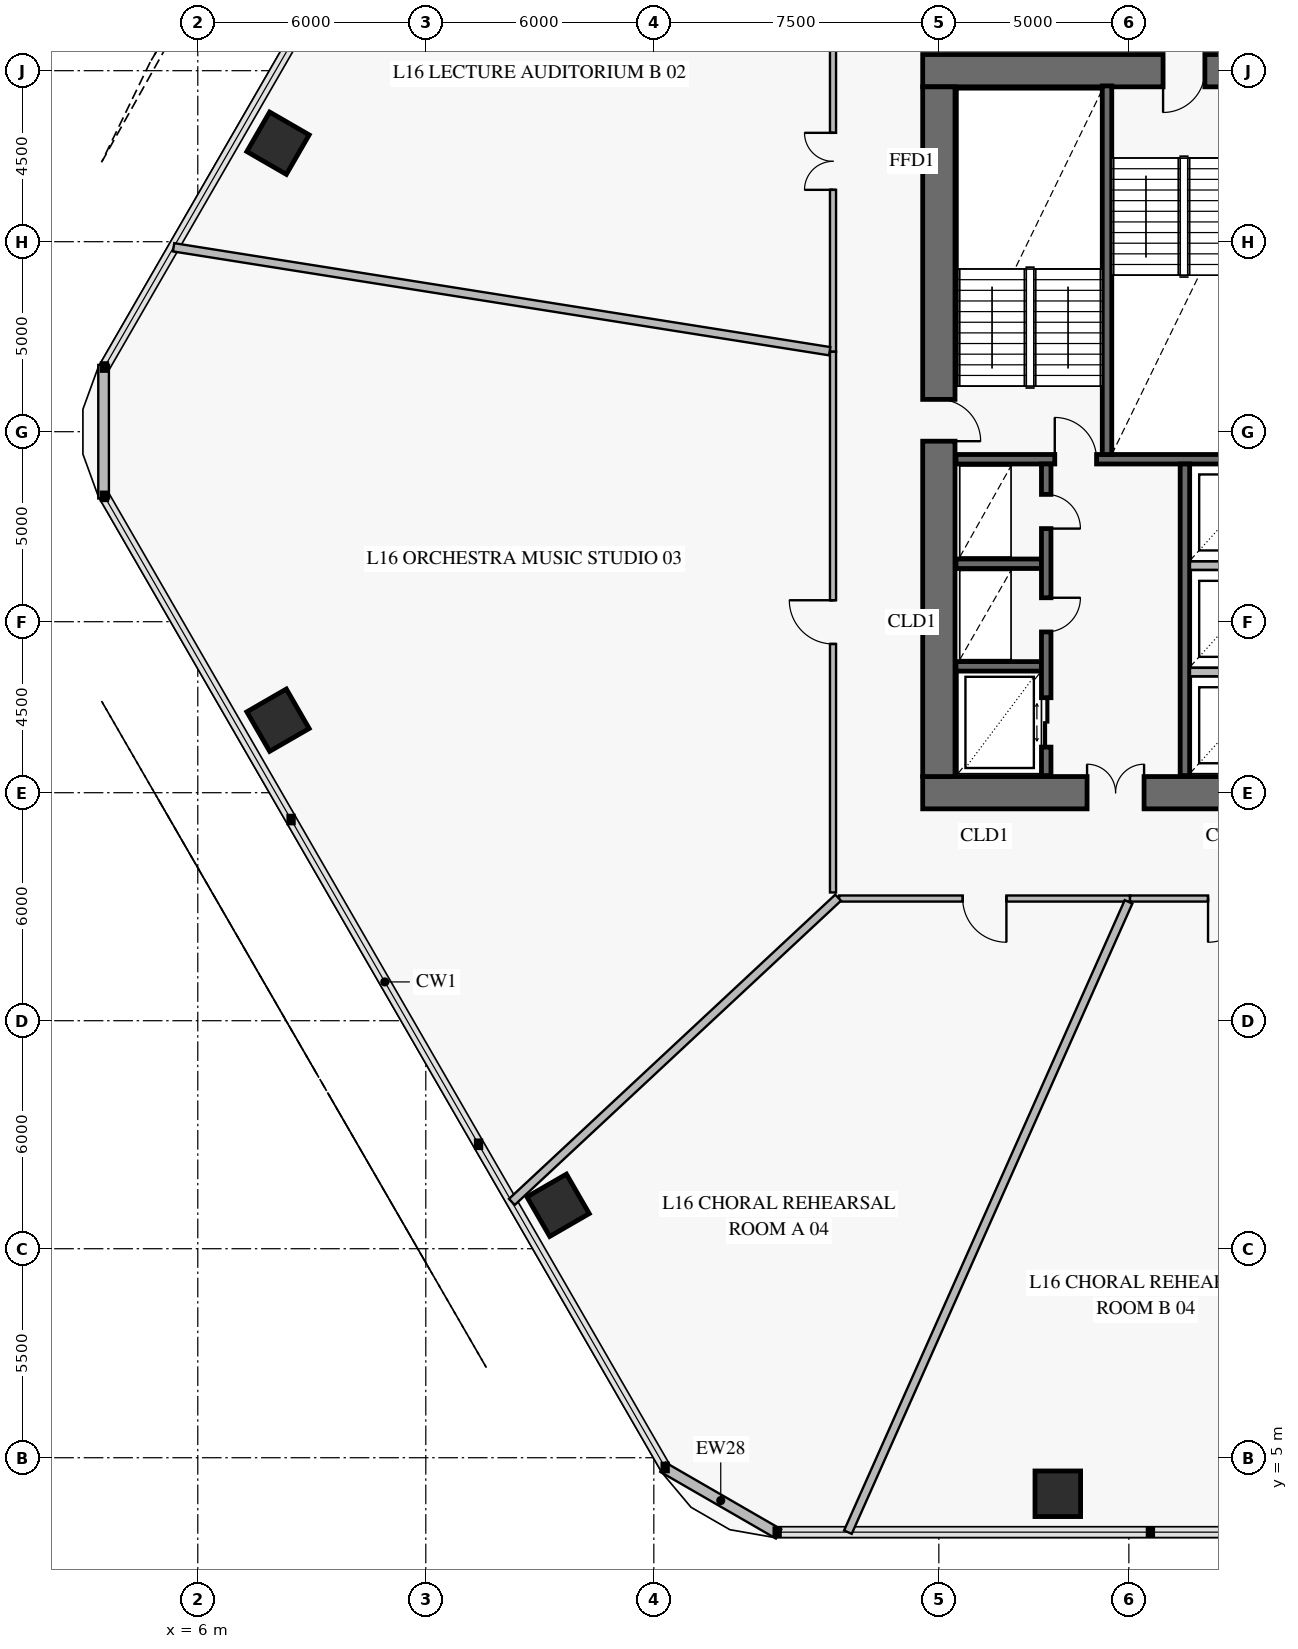
"""IFC4 building model, lengths in metres.
Left out: names, types, materials, properties, quantities, classifications, styles, units other than length and angle.
Written with IfcOpenShell. Run it as: python <this file> out.ifc"""

import sys

from ifc_helpers import new_model, si_unit, direction, frame, frame_2d, origin, origin_2d, place, context, subcontext, project, spatial, rectangle, extrude, element, fill, save


model = new_model("IFC4")
c1 = context("Model", 3, precision=1e-05, world=origin(), true_north=direction((0.0, 1.0)))
c2 = subcontext(c1, "Body", "Model", "MODEL_VIEW")
j1 = project(units=[si_unit("LENGTHUNIT", "METRE"), si_unit("PLANEANGLEUNIT", "RADIAN")], contexts=[c1])
p1 = place(None, origin())
s1 = spatial("IfcSite", under=j1, at=p1, CompositionType="ELEMENT")
p2 = place(p1, origin())
s2 = spatial("IfcBuilding", under=s1, at=p2, CompositionType="ELEMENT")
p3 = place(p2, frame((0.0, 0.0, 66.6)))
s3 = spatial("IfcBuildingStorey", under=s2, at=p3, CompositionType="ELEMENT", Elevation=66.6)
p4 = place(p3, frame((25.075, 22.5, 0.0), z_axis=(0.0, 0.0, 1.0), x_axis=(1.0, 0.0, 0.0)))
e1 = element("IfcWall", 1, at=p4, inside=s3, PredefinedType="SHEAR", context=c2, shape_type="SweptSolid", body=[
    extrude(rectangle(XDim=9.975, YDim=0.85, at=frame_2d((4.988, 0.0))), origin(), (0.0, 0.0, 1.0), 4.2),
])
p5 = place(p4, frame((4.325, 0.0, 0.0)))
e2 = element("IfcOpeningElement", 2, at=p5, cuts=e1, PredefinedType="OPENING", context=c2, shape_type="SweptSolid", body=[
    extrude(rectangle(XDim=1.5, YDim=2.15, at=frame_2d((0.75, 1.075))), frame((0.0, 0.437, 0.0), z_axis=(0.0, -1.0, 0.0), x_axis=(1.0, 0.0, 0.0)), (0.0, 0.0, 1.0), 0.874),
])
p6 = place(p3, frame((36.75, 41.5, 0.0), z_axis=(0.0, 0.0, 1.0), x_axis=(-1.0, 0.0, 0.0)))
e3 = element("IfcWall", 3, at=p6, inside=s3, PredefinedType="SHEAR", context=c2, shape_type="SweptSolid", body=[
    extrude(rectangle(XDim=11.675, YDim=0.85, at=frame_2d((5.837, 0.0))), origin(), (0.0, 0.0, 1.0), 4.2),
])
p7 = place(p6, frame((4.25, 0.0, 0.0)))
e4 = element("IfcOpeningElement", 4, at=p7, cuts=e3, PredefinedType="OPENING", context=c2, shape_type="SweptSolid", body=[
    extrude(rectangle(XDim=1.1, YDim=2.15, at=frame_2d((0.55, 1.075))), frame((0.0, 0.437, 0.0), z_axis=(0.0, -1.0, 0.0), x_axis=(1.0, 0.0, 0.0)), (0.0, 0.0, 1.0), 0.874),
])
p8 = place(p3, frame((25.5, 22.925, 0.0), z_axis=(0.0, 0.0, 1.0), x_axis=(0.0, 1.0, 0.0)))
e5 = element("IfcWall", 5, at=p8, inside=s3, PredefinedType="SHEAR", context=c2, shape_type="SweptSolid", body=[
    extrude(rectangle(XDim=18.15, YDim=0.85, at=frame_2d((9.075, 0.0))), origin(), (0.0, 0.0, 1.0), 4.2),
])
p9 = place(p8, frame((8.825, 0.0, 0.0)))
e6 = element("IfcOpeningElement", 6, at=p9, cuts=e5, PredefinedType="OPENING", context=c2, shape_type="SweptSolid", body=[
    extrude(rectangle(XDim=1.1, YDim=2.15, at=frame_2d((0.55, 1.075))), frame((0.0, 0.437, 0.0), z_axis=(0.0, -1.0, 0.0), x_axis=(1.0, 0.0, 0.0)), (0.0, 0.0, 1.0), 0.874),
])
for number, where, z_axis, x_axis in (
    (7, (8.111, 39.592, 0.0), (0.0, 0.0, 1.0), (-0.5, -0.866, 0.0)),
    (8, (8.111, 24.408, 0.0), (0.0, 0.0, 1.0), (0.5, -0.866, 0.0)),
    (9, (15.481, 11.643, 0.0), (0.0, 0.0, 1.0), (0.5, -0.866, 0.0)),
    (10, (28.63, 4.052, 0.0), (0.0, 0.0, 1.0), (1.0, 0.0, 0.0)),
):
    element("IfcColumn", number, at=place(p3, frame(where, z_axis=z_axis, x_axis=x_axis)), inside=s3, PredefinedType="COLUMN", context=c2, shape_type="SweptSolid", body=[
        extrude(rectangle(XDim=1.2, YDim=1.2, at=origin_2d()), origin(), (0.0, 0.0, 1.0), 3.92),
    ])
p10 = place(p3, frame((21.283, 2.994, 0.0), z_axis=(0.0, 0.0, 1.0), x_axis=(-0.866007452331, 0.500031091541, 0.0)))
e11 = element("IfcWall", 11, at=p10, inside=s3, PredefinedType="SOLIDWALL", context=c2, shape_type="SweptSolid", body=[
    extrude(rectangle(XDim=3.515, YDim=0.28, at=frame_2d((1.757, 0.0))), origin(), (0.0, 0.0, 1.0), 3.92),
])
p11 = place(p3, frame((3.521, 30.242, 0.0), z_axis=(0.0, 0.0, 1.0), x_axis=(0.0, 1.0, 0.0)))
e12 = element("IfcWall", 12, at=p11, inside=s3, PredefinedType="SOLIDWALL", context=c2, shape_type="SweptSolid", body=[
    extrude(rectangle(XDim=3.515, YDim=0.28, at=frame_2d((1.758, 0.0))), origin(), (0.0, 0.0, 1.0), 3.92),
])
p12 = place(p3, frame((25.95, 31.275, 0.0), z_axis=(0.0, 0.0, 1.0), x_axis=(1.0, 0.0, 0.0)))
e13 = element("IfcWall", 13, at=p12, inside=s3, PredefinedType="SOLIDWALL", context=c2, shape_type="SweptSolid", body=[
    extrude(rectangle(XDim=20.1, YDim=0.25, at=frame_2d((10.05, 0.0))), origin(), (0.0, 0.0, 1.0), 4.2),
])
p13 = place(p12, frame((2.6, 0.0, 0.0)))
e14 = element("IfcOpeningElement", 14, at=p13, cuts=e13, PredefinedType="OPENING", context=c2, shape_type="SweptSolid", body=[
    extrude(rectangle(XDim=1.1, YDim=2.15, at=frame_2d((0.55, 1.075))), frame((0.0, 0.137, 0.0), z_axis=(0.0, -1.0, 0.0), x_axis=(1.0, 0.0, 0.0)), (0.0, 0.0, 1.0), 0.274),
])
p14 = place(p12, frame((10.6, 0.0, 0.0)))
e15 = element("IfcOpeningElement", 15, at=p14, cuts=e13, PredefinedType="OPENING", context=c2, shape_type="SweptSolid", body=[
    extrude(rectangle(XDim=1.1, YDim=2.15, at=frame_2d((0.55, 1.075))), frame((0.0, 0.137, 0.0), z_axis=(0.0, -1.0, 0.0), x_axis=(1.0, 0.0, 0.0)), (0.0, 0.0, 1.0), 0.274),
])
p15 = place(p12, frame((16.35, 0.0, 0.0)))
e16 = element("IfcOpeningElement", 16, at=p15, cuts=e13, PredefinedType="OPENING", context=c2, shape_type="SweptSolid", body=[
    extrude(rectangle(XDim=1.1, YDim=2.15, at=frame_2d((0.55, 1.075))), frame((0.0, 0.137, 0.0), z_axis=(0.0, -1.0, 0.0), x_axis=(1.0, 0.0, 0.0)), (0.0, 0.0, 1.0), 0.274),
])
p16 = place(p3, frame((29.925, 31.4, 0.0), z_axis=(0.0, 0.0, 1.0), x_axis=(0.0, 1.0, 0.0)))
e17 = element("IfcWall", 17, at=p16, inside=s3, PredefinedType="SOLIDWALL", context=c2, shape_type="SweptSolid", body=[
    extrude(rectangle(XDim=9.7, YDim=0.25, at=frame_2d((4.85, 0.0))), origin(), (0.0, 0.0, 1.0), 4.2),
])
for number, where, z_axis, x_axis in (
    (18, (25.95, 25.825, 0.0), (0.0, 0.0, 1.0), (1.0, 0.0, 0.0)),
    (19, (25.95, 28.525, 0.0), (0.0, 0.0, 1.0), (1.0, 0.0, 0.0)),
):
    element("IfcWall", number, at=place(p3, frame(where, z_axis=z_axis, x_axis=x_axis)), inside=s3, PredefinedType="SOLIDWALL", context=c2, shape_type="SweptSolid", body=[
        extrude(rectangle(XDim=2.25, YDim=0.25, at=frame_2d((1.125, 0.0))), origin(), (0.0, 0.0, 1.0), 4.2),
    ])
p17 = place(p3, frame((28.325, 22.95, 0.0), z_axis=(0.0, 0.0, 1.0), x_axis=(0.0, 1.0, 0.0)))
e20 = element("IfcWall", 20, at=p17, inside=s3, PredefinedType="SOLIDWALL", context=c2, shape_type="SweptSolid", body=[
    extrude(rectangle(XDim=8.2, YDim=0.25, at=frame_2d((4.1, 0.0))), origin(), (0.0, 0.0, 1.0), 4.2),
])
p18 = place(p17, frame((0.75, 0.0, 0.0)))
e21 = element("IfcOpeningElement", 21, at=p18, cuts=e20, PredefinedType="OPENING", context=c2, shape_type="SweptSolid", body=[
    extrude(rectangle(XDim=1.3, YDim=2.3, at=frame_2d((0.65, 1.15))), frame((0.0, 0.137, 0.0), z_axis=(0.0, -1.0, 0.0), x_axis=(1.0, 0.0, 0.0)), (0.0, 0.0, 1.0), 0.274),
])
p19 = place(p17, frame((3.78, 0.0, 0.0)))
e22 = element("IfcOpeningElement", 22, at=p19, cuts=e20, PredefinedType="OPENING", context=c2, shape_type="SweptSolid", body=[
    extrude(rectangle(XDim=0.9, YDim=2.1, at=frame_2d((0.45, 1.05))), frame((0.0, 0.137, 0.0), z_axis=(0.0, -1.0, 0.0), x_axis=(1.0, 0.0, 0.0)), (0.0, 0.0, 1.0), 0.274),
])
p20 = place(p17, frame((6.5, 0.0, 0.0)))
e23 = element("IfcOpeningElement", 23, at=p20, cuts=e20, PredefinedType="OPENING", context=c2, shape_type="SweptSolid", body=[
    extrude(rectangle(XDim=0.9, YDim=2.1, at=frame_2d((0.45, 1.05))), frame((0.0, 0.137, 0.0), z_axis=(0.0, -1.0, 0.0), x_axis=(1.0, 0.0, 0.0)), (0.0, 0.0, 1.0), 0.274),
])
p21 = place(p3, frame((31.975, 22.95, 0.0), z_axis=(0.0, 0.0, 1.0), x_axis=(0.0, 1.0, 0.0)))
e24 = element("IfcWall", 24, at=p21, inside=s3, PredefinedType="SOLIDWALL", context=c2, shape_type="SweptSolid", body=[
    extrude(rectangle(XDim=8.2, YDim=0.25, at=frame_2d((4.1, 0.0))), origin(), (0.0, 0.0, 1.0), 4.2),
])
p22 = place(p3, frame((22.715, 44.125, 0.0), z_axis=(0.0, 0.0, 1.0), x_axis=(0.0, -1.0, 0.0)))
e25 = element("IfcWall", 25, at=p22, inside=s3, PredefinedType="PARTITIONING", context=c2, shape_type="SweptSolid", body=[
    extrude(rectangle(XDim=10.021, YDim=0.16, at=frame_2d((5.01, 0.0))), origin(), (0.0, 0.0, 1.0), 3.22),
])
p23 = place(p22, frame((4.26, 0.0, 0.0)))
e26 = element("IfcOpeningElement", 26, at=p23, cuts=e25, PredefinedType="OPENING", context=c2, shape_type="SweptSolid", body=[
    extrude(rectangle(XDim=1.5, YDim=2.15, at=frame_2d((0.75, 1.075))), frame((0.0, 0.092, 0.0), z_axis=(0.0, -1.0, 0.0), x_axis=(1.0, 0.0, 0.0)), (0.0, 0.0, 1.0), 0.184),
])
p24 = place(p3, frame((22.715, 34.104, 0.0), z_axis=(0.0, 0.0, 1.0), x_axis=(0.0, -1.0, 0.0)))
e27 = element("IfcWall", 27, at=p24, inside=s3, PredefinedType="PARTITIONING", context=c2, shape_type="SweptSolid", body=[
    extrude(rectangle(XDim=14.229, YDim=0.16, at=frame_2d((7.115, 0.0))), origin(), (0.0, 0.0, 1.0), 3.22),
])
p25 = place(p24, frame((6.54, 0.0, 0.0)))
e28 = element("IfcOpeningElement", 28, at=p25, cuts=e27, PredefinedType="OPENING", context=c2, shape_type="SweptSolid", body=[
    extrude(rectangle(XDim=1.15, YDim=2.2, at=frame_2d((0.575, 1.1))), frame((0.0, 0.092, 0.0), z_axis=(0.0, -1.0, 0.0), x_axis=(1.0, 0.0, 0.0)), (0.0, 0.0, 1.0), 0.184),
])
p26 = place(p3, frame((22.875, 19.715, 0.0), z_axis=(0.0, 0.0, 1.0), x_axis=(1.0, 0.0, 0.0)))
e29 = element("IfcWall", 29, at=p26, inside=s3, PredefinedType="PARTITIONING", context=c2, shape_type="SweptSolid", body=[
    extrude(rectangle(XDim=7.656, YDim=0.16, at=frame_2d((3.828, 0.0))), origin(), (0.0, 0.0, 1.0), 3.22),
])
p27 = place(p26, frame((3.253, 0.0, 0.0)))
e30 = element("IfcOpeningElement", 30, at=p27, cuts=e29, PredefinedType="OPENING", context=c2, shape_type="SweptSolid", body=[
    extrude(rectangle(XDim=1.15, YDim=2.2, at=frame_2d((0.575, 1.1))), frame((0.0, 0.092, 0.0), z_axis=(0.0, -1.0, 0.0), x_axis=(1.0, 0.0, 0.0)), (0.0, 0.0, 1.0), 0.184),
])
p28 = place(p3, frame((30.531, 19.715, 0.0), z_axis=(0.0, 0.0, 1.0), x_axis=(1.0, 0.0, 0.0)))
e31 = element("IfcWall", 31, at=p28, inside=s3, PredefinedType="PARTITIONING", context=c2, shape_type="SweptSolid", body=[
    extrude(rectangle(XDim=5.255, YDim=0.16, at=frame_2d((2.627, 0.0))), origin(), (0.0, 0.0, 1.0), 3.22),
])
p29 = place(p28, frame((2.052, 0.0, 0.0)))
e32 = element("IfcOpeningElement", 32, at=p29, cuts=e31, PredefinedType="OPENING", context=c2, shape_type="SweptSolid", body=[
    extrude(rectangle(XDim=1.15, YDim=2.2, at=frame_2d((0.575, 1.1))), frame((0.0, 0.092, 0.0), z_axis=(0.0, -1.0, 0.0), x_axis=(1.0, 0.0, 0.0)), (0.0, 0.0, 1.0), 0.184),
])
for number, where, z_axis, x_axis in (
    (33, (32.108, 25.675, 0.0), (0.0, 0.0, 1.0), (1.0, 0.0, 0.0)),
    (34, (32.108, 28.475, 0.0), (0.0, 0.0, 1.0), (1.0, 0.0, 0.0)),
):
    element("IfcWall", number, at=place(p3, frame(where, z_axis=z_axis, x_axis=x_axis)), inside=s3, PredefinedType="PARTITIONING", context=c2, shape_type="SweptSolid", body=[
        extrude(rectangle(XDim=2.284, YDim=0.22, at=frame_2d((1.142, 0.0))), origin(), (0.0, 0.0, 1.0), 3.92),
    ])
p30 = place(p3, frame((22.627, 34.118, 0.0), z_axis=(0.0, 0.0, 1.0), x_axis=(-0.987689809262, 0.156425191961, 0.0)))
e35 = element("IfcWall", 35, at=p30, inside=s3, PredefinedType="PARTITIONING", context=c2, shape_type="SweptSolid", body=[
    extrude(rectangle(XDim=17.479, YDim=0.22, at=frame_2d((8.739, 0.0))), origin(), (0.0, 0.0, 1.0), 3.17),
])
p31 = place(p3, frame((22.85, 19.737, 0.0), z_axis=(0.0, 0.0, 1.0), x_axis=(-0.731360864489, -0.681990678744, 0.0)))
e36 = element("IfcWall", 36, at=p31, inside=s3, PredefinedType="PARTITIONING", context=c2, shape_type="SweptSolid", body=[
    extrude(rectangle(XDim=11.74, YDim=0.22, at=frame_2d((5.87, 0.0))), origin(), (0.0, 0.0, 1.0), 3.17),
])
p32 = place(p3, frame((30.491, 19.627, 0.0), z_axis=(0.0, 0.0, 1.0), x_axis=(-0.406746008396, -0.913541287876, 0.0)))
e37 = element("IfcWall", 37, at=p32, inside=s3, PredefinedType="PARTITIONING", context=c2, shape_type="SweptSolid", body=[
    extrude(rectangle(XDim=18.155, YDim=0.22, at=frame_2d((9.078, 0.0))), origin(), (0.0, 0.0, 1.0), 3.17),
])
p33 = place(p9, frame((1.1, 0.0, 0.0), z_axis=(0.0, 0.0, 1.0), x_axis=(-1.0, 0.0, 0.0)))
e38 = element("IfcDoor", 38, at=p33, inside=s3, OperationType="SINGLE_SWING_RIGHT", PredefinedType="USERDEFINED", context=c2, shape_type="SweptSolid", body=[
    extrude(rectangle(XDim=1.1, YDim=2.15, at=frame_2d((0.55, 1.075))), frame((0.0, 0.025, 0.0), z_axis=(0.0, -1.0, 0.0), x_axis=(1.0, 0.0, 0.0)), (0.0, 0.0, 1.0), 0.05),
])
fill(e6, e38)
p34 = place(p7, origin())
e39 = element("IfcDoor", 39, at=p34, inside=s3, OperationType="SINGLE_SWING_RIGHT", PredefinedType="USERDEFINED", context=c2, shape_type="SweptSolid", body=[
    extrude(rectangle(XDim=1.1, YDim=2.15, at=frame_2d((0.55, 1.075))), frame((0.0, 0.025, 0.0), z_axis=(0.0, -1.0, 0.0), x_axis=(1.0, 0.0, 0.0)), (0.0, 0.0, 1.0), 0.05),
])
fill(e4, e39)
p35 = place(p5, origin())
e40 = element("IfcDoor", 40, at=p35, inside=s3, OperationType="DOUBLE_DOOR_SINGLE_SWING", PredefinedType="DOOR", context=c2, shape_type="SweptSolid", body=[
    extrude(rectangle(XDim=1.5, YDim=2.15, at=frame_2d((0.75, 1.075))), frame((0.0, 0.025, 0.0), z_axis=(0.0, -1.0, 0.0), x_axis=(1.0, 0.0, 0.0)), (0.0, 0.0, 1.0), 0.05),
])
fill(e2, e40)
p36 = place(p13, origin())
e41 = element("IfcDoor", 41, at=p36, inside=s3, OperationType="SINGLE_SWING_LEFT", PredefinedType="USERDEFINED", context=c2, shape_type="SweptSolid", body=[
    extrude(rectangle(XDim=1.1, YDim=2.15, at=frame_2d((0.55, 1.075))), frame((0.0, 0.025, 0.0), z_axis=(0.0, -1.0, 0.0), x_axis=(1.0, 0.0, 0.0)), (0.0, 0.0, 1.0), 0.05),
])
fill(e14, e41)
p37 = place(p18, frame((1.3, 0.0, 0.0), z_axis=(0.0, 0.0, 1.0), x_axis=(-1.0, 0.0, 0.0)))
e42 = element("IfcDoor", 42, at=p37, inside=s3, OperationType="DOUBLE_DOOR_SLIDING", PredefinedType="DOOR", context=c2, shape_type="SweptSolid", body=[
    extrude(rectangle(XDim=1.3, YDim=2.3, at=frame_2d((0.65, 1.15))), frame((0.0, 0.025, 0.0), z_axis=(0.0, -1.0, 0.0), x_axis=(1.0, 0.0, 0.0)), (0.0, 0.0, 1.0), 0.05),
])
fill(e21, e42)
p38 = place(p19, frame((0.9, 0.0, 0.0), z_axis=(0.0, 0.0, 1.0), x_axis=(-1.0, 0.0, 0.0)))
e43 = element("IfcDoor", 43, at=p38, inside=s3, OperationType="SINGLE_SWING_LEFT", PredefinedType="DOOR", context=c2, shape_type="SweptSolid", body=[
    extrude(rectangle(XDim=0.9, YDim=2.1, at=frame_2d((0.45, 1.05))), frame((0.0, 0.025, 0.0), z_axis=(0.0, -1.0, 0.0), x_axis=(1.0, 0.0, 0.0)), (0.0, 0.0, 1.0), 0.05),
])
fill(e22, e43)
p39 = place(p20, frame((0.9, 0.0, 0.0), z_axis=(0.0, 0.0, 1.0), x_axis=(-1.0, 0.0, 0.0)))
e44 = element("IfcDoor", 44, at=p39, inside=s3, OperationType="SINGLE_SWING_RIGHT", PredefinedType="DOOR", context=c2, shape_type="SweptSolid", body=[
    extrude(rectangle(XDim=0.9, YDim=2.1, at=frame_2d((0.45, 1.05))), frame((0.0, 0.025, 0.0), z_axis=(0.0, -1.0, 0.0), x_axis=(1.0, 0.0, 0.0)), (0.0, 0.0, 1.0), 0.05),
])
fill(e23, e44)
p40 = place(p23, frame((1.5, 0.0, 0.0), z_axis=(0.0, 0.0, 1.0), x_axis=(-1.0, 0.0, 0.0)))
e45 = element("IfcDoor", 45, at=p40, inside=s3, OperationType="DOUBLE_DOOR_SINGLE_SWING", PredefinedType="DOOR", context=c2, shape_type="SweptSolid", body=[
    extrude(rectangle(XDim=1.5, YDim=2.15, at=frame_2d((0.75, 1.075))), frame((0.0, 0.025, 0.0), z_axis=(0.0, -1.0, 0.0), x_axis=(1.0, 0.0, 0.0)), (0.0, 0.0, 1.0), 0.05),
])
fill(e26, e45)
p41 = place(p25, frame((1.15, 0.0, 0.0), z_axis=(0.0, 0.0, 1.0), x_axis=(-1.0, 0.0, 0.0)))
e46 = element("IfcDoor", 46, at=p41, inside=s3, OperationType="SINGLE_SWING_RIGHT", PredefinedType="DOOR", context=c2, shape_type="SweptSolid", body=[
    extrude(rectangle(XDim=1.15, YDim=2.2, at=frame_2d((0.575, 1.1))), frame((0.0, 0.025, 0.0), z_axis=(0.0, -1.0, 0.0), x_axis=(1.0, 0.0, 0.0)), (0.0, 0.0, 1.0), 0.05),
])
fill(e28, e46)
p42 = place(p27, frame((1.15, 0.0, 0.0), z_axis=(0.0, 0.0, 1.0), x_axis=(-1.0, 0.0, 0.0)))
e47 = element("IfcDoor", 47, at=p42, inside=s3, OperationType="SINGLE_SWING_LEFT", PredefinedType="DOOR", context=c2, shape_type="SweptSolid", body=[
    extrude(rectangle(XDim=1.15, YDim=2.2, at=frame_2d((0.575, 1.1))), frame((0.0, 0.025, 0.0), z_axis=(0.0, -1.0, 0.0), x_axis=(1.0, 0.0, 0.0)), (0.0, 0.0, 1.0), 0.05),
])
fill(e30, e47)
p43 = place(p29, frame((1.15, 0.0, 0.0), z_axis=(0.0, 0.0, 1.0), x_axis=(-1.0, 0.0, 0.0)))
e48 = element("IfcDoor", 48, at=p43, inside=s3, OperationType="SINGLE_SWING_RIGHT", PredefinedType="DOOR", context=c2, shape_type="SweptSolid", body=[
    extrude(rectangle(XDim=1.15, YDim=2.2, at=frame_2d((0.575, 1.1))), frame((0.0, 0.025, 0.0), z_axis=(0.0, -1.0, 0.0), x_axis=(1.0, 0.0, 0.0)), (0.0, 0.0, 1.0), 0.05),
])
fill(e32, e48)
save(model, sys.argv[1])
